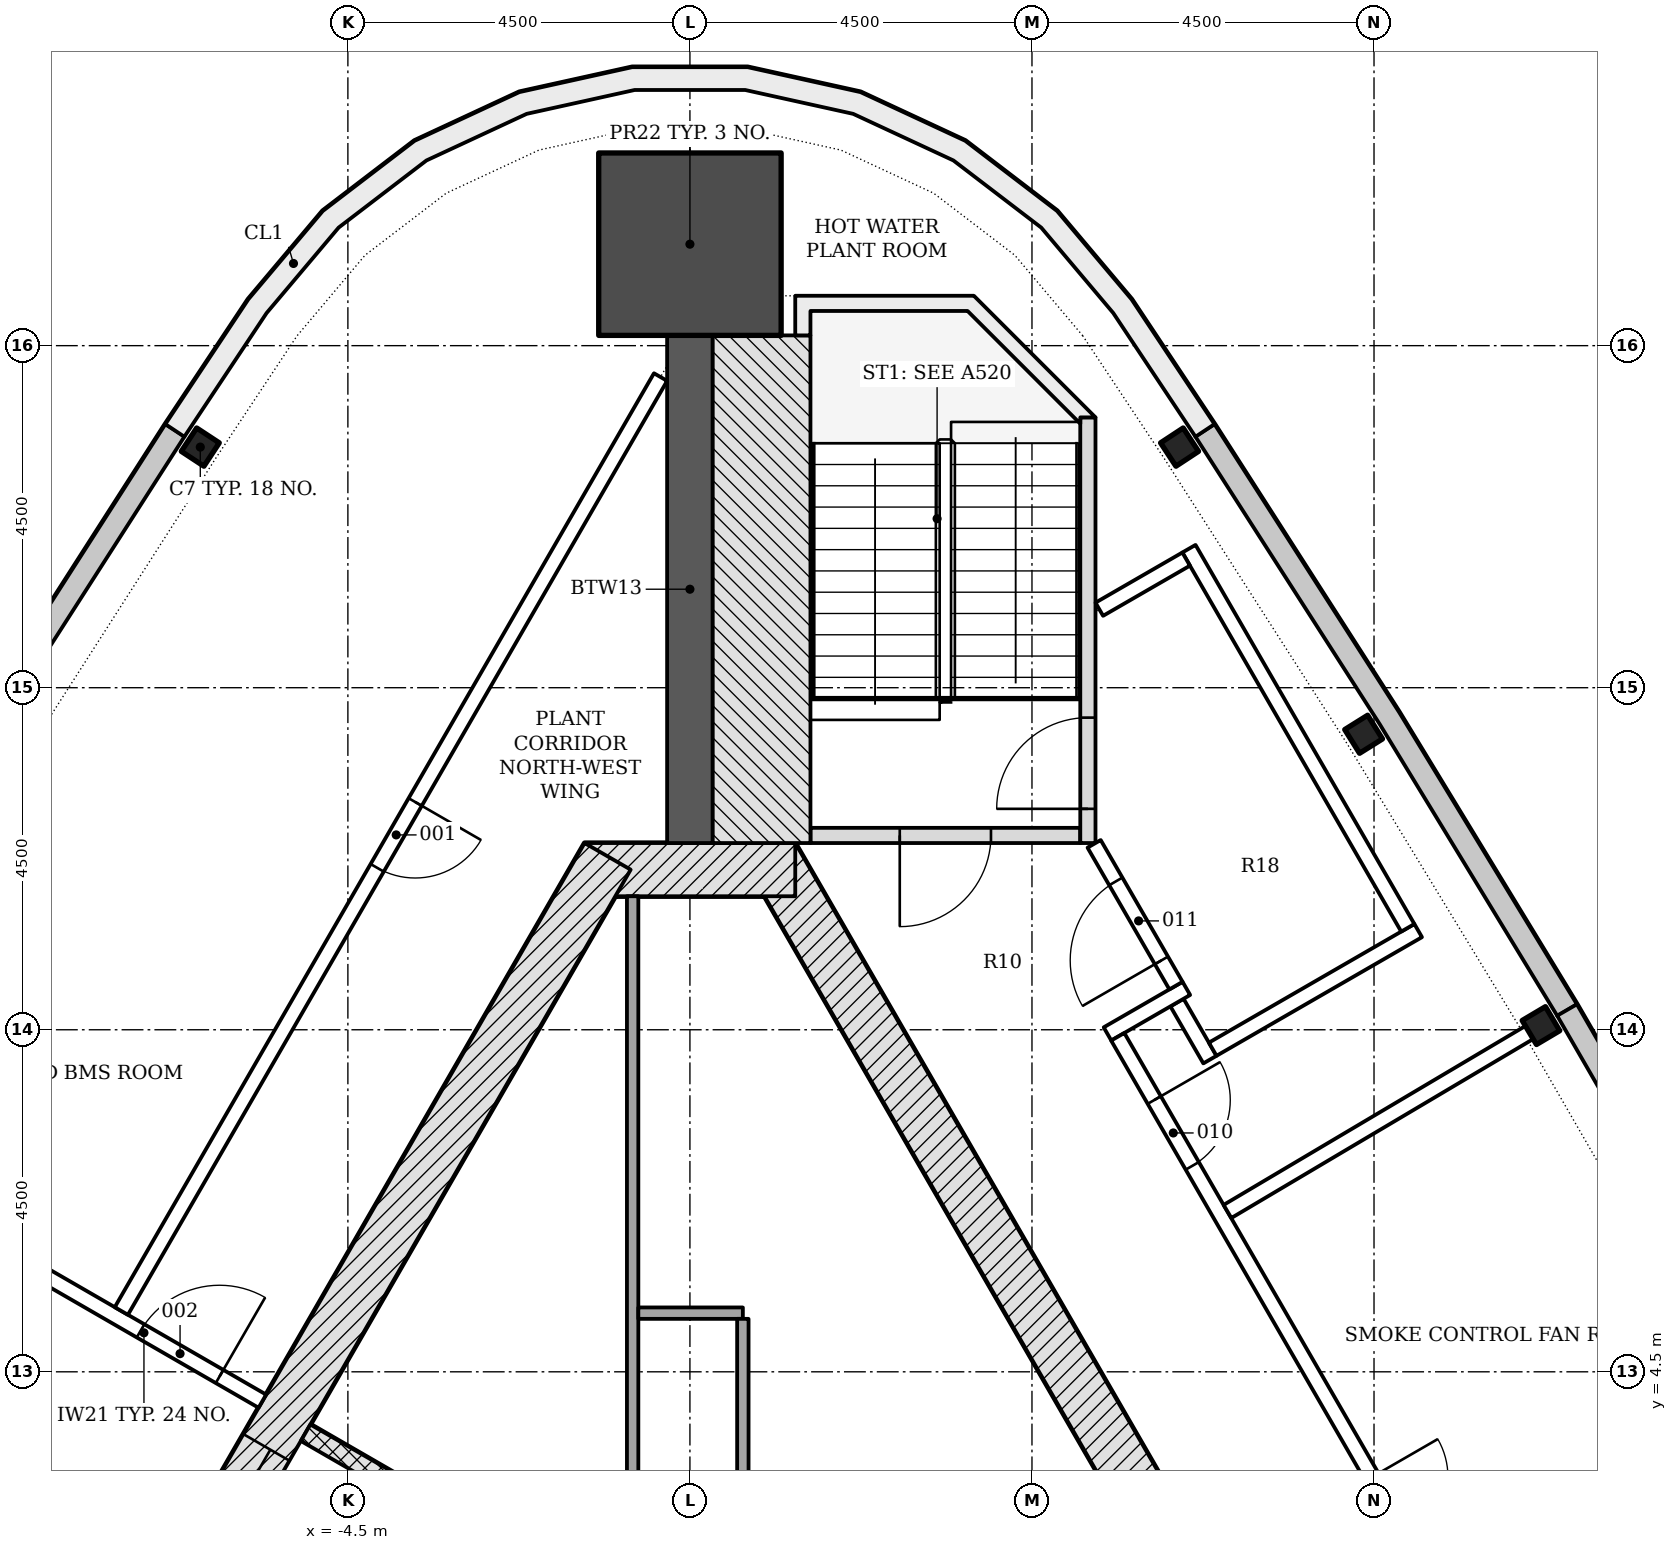
"""IFC4 building model, lengths in metres.
Left out: names, types, materials, properties, quantities, classifications, styles, units other than length and angle.
Written with IfcOpenShell. Run it as: python <this file> out.ifc"""

import sys

from ifc_helpers import new_model, si_unit, direction, frame, frame_2d, origin, origin_2d, place, context, subcontext, project, spatial, polyline, rectangle, i_section, outline, extrude, element, fill, save


model = new_model("IFC4")
c1 = context("Model", 3, precision=1e-05, world=origin(), true_north=direction((0.0, 1.0)))
c2 = subcontext(c1, "Body", "Model", "MODEL_VIEW")
j1 = project(units=[si_unit("LENGTHUNIT", "METRE"), si_unit("PLANEANGLEUNIT", "RADIAN")], contexts=[c1])
p1 = place(None, origin())
s1 = spatial("IfcSite", under=j1, at=p1, CompositionType="ELEMENT")
p2 = place(p1, origin())
s2 = spatial("IfcBuilding", under=s1, at=p2, CompositionType="ELEMENT")
p3 = place(p2, frame((0.0, 0.0, 293.1)))
s3 = spatial("IfcBuildingStorey", under=s2, at=p3, CompositionType="ELEMENT", Elevation=293.1)
p4 = place(p3, frame((10.311, -4.703, -0.25), z_axis=(0.0, 0.0, 1.0), x_axis=(-0.500001446645, 0.866024568562, 0.0)))
e1 = element("IfcWall", 1, at=p4, inside=s3, PredefinedType="SHEAR", context=c2, shape_type="SweptSolid", body=[
    extrude(rectangle(XDim=18.458, YDim=0.7, at=frame_2d((9.229, 0.0))), origin(), (0.0, 0.0, 1.0), 4.5),
])
p5 = place(p3, frame((1.386, 11.106, -0.25), z_axis=(0.0, 0.0, 1.0), x_axis=(-1.0, 0.0, 0.0)))
e2 = element("IfcWall", 2, at=p5, inside=s3, PredefinedType="SHEAR", context=c2, shape_type="SweptSolid", body=[
    extrude(rectangle(XDim=2.771, YDim=0.7, at=frame_2d((1.386, 0.0))), origin(), (0.0, 0.0, 1.0), 4.5),
])
p6 = place(p3, frame((-1.083, 11.281, -0.25), z_axis=(0.0, 0.0, 1.0), x_axis=(-0.500001446645, -0.866024568562, 0.0)))
e3 = element("IfcWall", 3, at=p6, inside=s3, PredefinedType="SHEAR", context=c2, shape_type="SweptSolid", body=[
    extrude(rectangle(XDim=18.458, YDim=0.7, at=frame_2d((9.229, 0.0))), origin(), (0.0, 0.0, 1.0), 4.5),
])
p7 = place(p6, frame((8.979, 0.0, 0.25)))
e4 = element("IfcOpeningElement", 4, at=p7, cuts=e3, PredefinedType="OPENING", context=c2, shape_type="SweptSolid", body=[
    extrude(rectangle(XDim=1.2, YDim=2.1, at=frame_2d((0.6, 1.05))), frame((0.0, 0.36, 0.0), z_axis=(0.0, -1.0, 0.0), x_axis=(1.0, 0.0, 0.0)), (0.0, 0.0, 1.0), 0.72),
])
p8 = place(p6, frame((11.029, 0.0, 0.25)))
e5 = element("IfcOpeningElement", 5, at=p8, cuts=e3, PredefinedType="OPENING", context=c2, shape_type="SweptSolid", body=[
    extrude(rectangle(XDim=1.2, YDim=2.1, at=frame_2d((0.6, 1.05))), frame((0.0, 0.36, 0.0), z_axis=(0.0, -1.0, 0.0), x_axis=(1.0, 0.0, 0.0)), (0.0, 0.0, 1.0), 0.72),
])
p9 = place(p3, frame((0.0, 11.456, -0.25), z_axis=(0.0, 0.0, 1.0), x_axis=(0.0, 1.0, 0.0)))
e6 = element("IfcWall", 6, at=p9, inside=s3, PredefinedType="SHEAR", context=c2, shape_type="SweptSolid", body=[
    extrude(rectangle(XDim=6.679, YDim=0.6, at=frame_2d((3.339, 0.0))), origin(), (0.0, 0.0, 1.0), 4.5),
])
p10 = place(p3, frame((0.0, 19.335, -0.25), z_axis=(0.0, 0.0, 1.0), x_axis=(0.0, 1.0, 0.0)))
e7 = element("IfcColumn", 7, at=p10, inside=s3, PredefinedType="COLUMN", context=c2, shape_type="SweptSolid", body=[
    extrude(rectangle(XDim=2.4, YDim=2.4, at=origin_2d()), origin(), (0.0, 0.0, 1.0), 4.5),
])
for number, where, z_axis, x_axis in (
    (8, (-6.442, 16.666, -0.25), (0.0, 0.0, 1.0), (-0.549, -0.836, 0.0)),
    (9, (11.196, 9.055, -0.25), (0.0, 0.0, 1.0), (-0.51, 0.86, 0.0)),
    (10, (8.863, 12.888, -0.25), (0.0, 0.0, 1.0), (-0.53, 0.848, 0.0)),
    (11, (6.442, 16.666, -0.25), (0.0, 0.0, 1.0), (-0.549, 0.836, 0.0)),
):
    element("IfcColumn", number, at=place(p3, frame(where, z_axis=z_axis, x_axis=x_axis)), inside=s3, PredefinedType="COLUMN", context=c2, shape_type="SweptSolid", body=[
        extrude(i_section(OverallWidth=0.368, OverallDepth=0.356, WebThickness=0.011, FlangeThickness=0.018, FilletRadius=0.015, at=origin_2d()), origin(), (0.0, 0.0, 1.0), 4.5),
    ])
p11 = place(p3, origin())
e12 = element("IfcWall", 12, at=p11, inside=s3, PredefinedType="NOTDEFINED", context=c2, shape_type="SweptSolid", body=[
    extrude(outline(polyline([(-6.901, 16.968), (-9.33, 13.179), (-11.669, 9.335), (-11.413, 9.179), (-9.075, 13.02), (-6.649, 16.806), (-6.901, 16.968)])), origin(), (0.0, 0.0, 1.0), 4.25),
])
p12 = place(p3, origin())
e13 = element("IfcWall", 13, at=p12, inside=s3, PredefinedType="NOTDEFINED", context=c2, shape_type="SweptSolid", body=[
    extrude(outline(polyline([(11.669, 9.335), (9.33, 13.179), (6.901, 16.968), (6.649, 16.806), (9.075, 13.02), (11.413, 9.179), (11.669, 9.335)])), origin(), (0.0, 0.0, 1.0), 4.25),
])
p13 = place(p3, origin())
e14 = element("IfcWall", 14, at=p13, inside=s3, PredefinedType="NOTDEFINED", context=c2, shape_type="SweptSolid", body=[
    extrude(outline(polyline([(13.919, 5.438), (11.669, 9.335), (11.409, 9.185), (13.659, 5.288), (13.919, 5.438)])), origin(), (0.0, 0.0, 1.0), 1.2),
])
p14 = place(p3, origin())
e15 = element("IfcWall", 15, at=p14, inside=s3, PredefinedType="NOTDEFINED", context=c2, shape_type="SweptSolid", body=[
    extrude(outline(polyline([(6.901, 16.968), (5.81, 18.61), (4.83, 19.771), (3.623, 20.695), (2.244, 21.335), (0.76, 21.664), (-0.76, 21.664), (-2.244, 21.335), (-3.623, 20.695), (-4.83, 19.771), (-5.81, 18.61), (-6.901, 16.968), (-6.651, 16.802), (-5.569, 18.429), (-4.622, 19.553), (-3.466, 20.437), (-2.147, 21.05), (-0.727, 21.364), (0.727, 21.364), (2.147, 21.05), (3.466, 20.437), (4.622, 19.553), (5.569, 18.429), (6.651, 16.802), (6.901, 16.968)])), origin(), (0.0, 0.0, 1.0), 4.25),
])
p15 = place(p3, frame((-5.056, 3.699, -0.25), z_axis=(0.0, 0.0, 1.0), x_axis=(0.866032775405, -0.499987231761, 0.0)))
e16 = element("IfcWall", 16, at=p15, inside=s3, PredefinedType="PARTITIONING", context=c2, shape_type="SweptSolid", body=[
    extrude(rectangle(XDim=2.9, YDim=0.25, at=frame_2d((1.45, 0.0))), origin(), (0.0, 0.0, 1.0), 4.5),
])
p16 = place(p3, frame((-0.754, 10.756, 0.0), z_axis=(0.0, 0.0, 1.0), x_axis=(0.0, -1.0, 0.0)))
e17 = element("IfcWall", 17, at=p16, inside=s3, PredefinedType="PARTITIONING", context=c2, shape_type="SweptSolid", body=[
    extrude(rectangle(XDim=16.985, YDim=0.15, at=frame_2d((8.492, 0.0))), origin(), (0.0, 0.0, 1.0), 4.25),
])
p17 = place(p16, frame((9.185, 0.0, 0.0)))
e18 = element("IfcOpeningElement", 18, at=p17, cuts=e17, PredefinedType="OPENING", context=c2, shape_type="SweptSolid", body=[
    extrude(rectangle(XDim=0.9, YDim=2.1, at=frame_2d((0.45, 1.05))), frame((0.0, 0.085, 0.0), z_axis=(0.0, -1.0, 0.0), x_axis=(1.0, 0.0, 0.0)), (0.0, 0.0, 1.0), 0.17),
])
p18 = place(p3, frame((-0.679, 5.272, 0.0), z_axis=(0.0, 0.0, 1.0), x_axis=(1.0, 0.0, 0.0)))
e19 = element("IfcWall", 19, at=p18, inside=s3, PredefinedType="PARTITIONING", context=c2, shape_type="SweptSolid", body=[
    extrude(rectangle(XDim=1.375, YDim=0.15, at=frame_2d((0.688, 0.0))), origin(), (0.0, 0.0, 1.0), 4.25),
])
p19 = place(p3, frame((0.696, 5.197, 0.0), z_axis=(0.0, 0.0, 1.0), x_axis=(0.0, -1.0, 0.0)))
e20 = element("IfcWall", 20, at=p19, inside=s3, PredefinedType="PARTITIONING", context=c2, shape_type="SweptSolid", body=[
    extrude(rectangle(XDim=11.425, YDim=0.15, at=frame_2d((5.712, 0.0))), origin(), (0.0, 0.0, 1.0), 4.25),
])
p20 = place(p19, frame((3.664, 0.0, 0.0)))
e21 = element("IfcOpeningElement", 21, at=p20, cuts=e20, PredefinedType="OPENING", context=c2, shape_type="SweptSolid", body=[
    extrude(rectangle(XDim=0.9, YDim=2.1, at=frame_2d((0.45, 1.05))), frame((0.0, 0.085, 0.0), z_axis=(0.0, -1.0, 0.0), x_axis=(1.0, 0.0, 0.0)), (0.0, 0.0, 1.0), 0.17),
])
p21 = place(p3, frame((5.135, 11.556, -0.25), z_axis=(0.0, 0.0, 1.0), x_axis=(-1.0, 0.0, 0.0)))
e22 = element("IfcWall", 22, at=p21, inside=s3, PredefinedType="SHEAR", context=c2, shape_type="SweptSolid", body=[
    extrude(rectangle(XDim=3.55, YDim=0.2, at=frame_2d((1.775, 0.0))), origin(), (0.0, 0.0, 1.0), 4.5),
])
p22 = place(p21, frame((1.175, 0.0, 0.25)))
e23 = element("IfcOpeningElement", 23, at=p22, cuts=e22, PredefinedType="OPENING", context=c2, shape_type="SweptSolid", body=[
    extrude(rectangle(XDim=1.2, YDim=2.1, at=frame_2d((0.6, 1.05))), frame((0.0, 0.11, 0.0), z_axis=(0.0, -1.0, 0.0), x_axis=(1.0, 0.0, 0.0)), (0.0, 0.0, 1.0), 0.22),
])
p23 = place(p3, frame((5.236, 11.456, -0.25), z_axis=(0.0, 0.0, 1.0), x_axis=(0.0, 1.0, 0.0)))
e24 = element("IfcWall", 24, at=p23, inside=s3, PredefinedType="SHEAR", context=c2, shape_type="SweptSolid", body=[
    extrude(rectangle(XDim=5.6, YDim=0.2, at=frame_2d((2.8, 0.0))), origin(), (0.0, 0.0, 1.0), 4.5),
])
p24 = place(p23, frame((0.45, 0.0, 0.25)))
e25 = element("IfcOpeningElement", 25, at=p24, cuts=e24, PredefinedType="OPENING", context=c2, shape_type="SweptSolid", body=[
    extrude(rectangle(XDim=1.2, YDim=2.1, at=frame_2d((0.6, 1.05))), frame((0.0, 0.11, 0.0), z_axis=(0.0, -1.0, 0.0), x_axis=(1.0, 0.0, 0.0)), (0.0, 0.0, 1.0), 0.22),
])
p25 = place(p3, frame((0.943, 11.456, -0.25), z_axis=(0.0, 0.0, 1.0), x_axis=(0.0, 1.0, 0.0)))
e26 = element("IfcWall", 26, at=p25, inside=s3, PredefinedType="SHEAR", context=c2, shape_type="SweptSolid", body=[
    extrude(rectangle(XDim=6.679, YDim=1.286, at=frame_2d((3.339, 0.0))), origin(), (0.0, 0.0, 1.0), 4.5),
])
p26 = place(p3, frame((0.0, 0.0, -0.25)))
e27 = element("IfcWall", 27, at=p26, inside=s3, PredefinedType="SHEAR", context=c2, shape_type="SweptSolid", body=[
    extrude(outline(polyline([(5.336, 17.056), (3.736, 18.656), (1.385, 18.656), (1.385, 18.135), (1.586, 18.135), (1.586, 18.456), (3.653, 18.456), (5.135, 16.974), (5.135, 17.056), (5.135, 17.056), (5.135, 17.056), (5.135, 17.056), (5.135, 17.056), (5.135, 17.056), (5.135, 17.056), (5.135, 17.056), (5.135, 17.056), (5.135, 17.056), (5.135, 17.056), (5.135, 17.056), (5.135, 17.056), (5.135, 17.056), (5.135, 17.056), (5.135, 17.056), (5.135, 17.056), (5.336, 17.056)])), origin(), (0.0, 0.0, 1.0), 4.5),
])
p27 = place(p3, frame((-8.741, 5.913, 0.0), z_axis=(0.0, 0.0, 1.0), x_axis=(0.866017220491, -0.500014173611, 0.0)))
e28 = element("IfcWall", 28, at=p27, inside=s3, PredefinedType="PARTITIONING", context=c2, shape_type="SweptSolid", body=[
    extrude(rectangle(XDim=3.598, YDim=0.2, at=frame_2d((1.799, 0.0))), origin(), (0.0, 0.0, 1.0), 4.25),
])
p28 = place(p27, frame((1.748, 0.0, 0.0)))
e29 = element("IfcOpeningElement", 29, at=p28, cuts=e28, PredefinedType="OPENING", context=c2, shape_type="SweptSolid", body=[
    extrude(rectangle(XDim=1.2, YDim=2.1, at=frame_2d((0.6, 1.05))), frame((0.0, 0.11, 0.0), z_axis=(0.0, -1.0, 0.0), x_axis=(1.0, 0.0, 0.0)), (0.0, 0.0, 1.0), 0.22),
])
p29 = place(p3, frame((-0.387, 17.587, 0.0), z_axis=(0.0, 0.0, 1.0), x_axis=(-0.499990582914, -0.866030840673, 0.0)))
e30 = element("IfcWall", 30, at=p29, inside=s3, PredefinedType="PARTITIONING", context=c2, shape_type="SweptSolid", body=[
    extrude(rectangle(XDim=14.187, YDim=0.2, at=frame_2d((7.094, 0.0))), origin(), (0.0, 0.0, 1.0), 3.702),
])
p30 = place(p29, frame((6.455, 0.0, 0.0)))
e31 = element("IfcOpeningElement", 31, at=p30, cuts=e30, PredefinedType="OPENING", context=c2, shape_type="SweptSolid", body=[
    extrude(rectangle(XDim=1.0, YDim=2.1, at=frame_2d((0.5, 1.05))), frame((0.0, 0.11, 0.0), z_axis=(0.0, -1.0, 0.0), x_axis=(1.0, 0.0, 0.0)), (0.0, 0.0, 1.0), 0.22),
])
p31 = place(p3, frame((6.408, 9.358, 0.0), z_axis=(0.0, 0.0, 1.0), x_axis=(0.499958279983, -0.866049489508, 0.0)))
e32 = element("IfcWall", 32, at=p31, inside=s3, PredefinedType="PARTITIONING", context=c2, shape_type="SweptSolid", body=[
    extrude(rectangle(XDim=0.866, YDim=0.2, at=frame_2d((0.433, 0.0))), origin(), (0.0, 0.0, 1.0), 4.25),
])
p32 = place(p3, frame((5.494, 8.945, 0.0), z_axis=(0.0, 0.0, 1.0), x_axis=(0.866039638822, 0.499975343382, 0.0)))
e33 = element("IfcWall", 33, at=p32, inside=s3, PredefinedType="PARTITIONING", context=c2, shape_type="SweptSolid", body=[
    extrude(rectangle(XDim=1.198, YDim=0.2, at=frame_2d((0.599, 0.0))), origin(), (0.0, 0.0, 1.0), 4.25),
])
p33 = place(p3, frame((6.395, 9.581, 0.0), z_axis=(0.0, 0.0, 1.0), x_axis=(-0.500003735859, 0.866023246874, 0.0)))
e34 = element("IfcWall", 34, at=p33, inside=s3, PredefinedType="PARTITIONING", context=c2, shape_type="SweptSolid", body=[
    extrude(rectangle(XDim=2.154, YDim=0.2, at=frame_2d((1.077, 0.0))), origin(), (0.0, 0.0, 1.0), 3.702),
])
p34 = place(p33, frame((0.383, 0.0, 0.0)))
e35 = element("IfcOpeningElement", 35, at=p34, cuts=e34, PredefinedType="OPENING", context=c2, shape_type="SweptSolid", body=[
    extrude(rectangle(XDim=1.2, YDim=2.1, at=frame_2d((0.6, 1.05))), frame((0.0, 0.11, 0.0), z_axis=(0.0, -1.0, 0.0), x_axis=(1.0, 0.0, 0.0)), (0.0, 0.0, 1.0), 0.22),
])
p35 = place(p3, frame((5.628, 8.908, 0.0), z_axis=(0.0, 0.0, 1.0), x_axis=(0.500003229304, -0.866023539337, 0.0)))
e36 = element("IfcWall", 36, at=p35, inside=s3, PredefinedType="PARTITIONING", context=c2, shape_type="SweptSolid", body=[
    extrude(rectangle(XDim=20.297, YDim=0.2, at=frame_2d((10.148, 0.0))), origin(), (0.0, 0.0, 1.0), 3.702),
])
p36 = place(p35, frame((15.459, 0.0, 0.0)))
e37 = element("IfcOpeningElement", 37, at=p36, cuts=e36, PredefinedType="OPENING", context=c2, shape_type="SweptSolid", body=[
    extrude(rectangle(XDim=1.0, YDim=2.1, at=frame_2d((0.5, 1.05))), frame((0.0, 0.11, 0.0), z_axis=(0.0, -1.0, 0.0), x_axis=(1.0, 0.0, 0.0)), (0.0, 0.0, 1.0), 0.22),
])
p37 = place(p35, frame((6.689, 0.0, 0.0)))
e38 = element("IfcOpeningElement", 38, at=p37, cuts=e36, PredefinedType="OPENING", context=c2, shape_type="SweptSolid", body=[
    extrude(rectangle(XDim=1.0, YDim=2.1, at=frame_2d((0.5, 1.05))), frame((0.0, 0.11, 0.0), z_axis=(0.0, -1.0, 0.0), x_axis=(1.0, 0.0, 0.0)), (0.0, 0.0, 1.0), 0.22),
])
p38 = place(p35, frame((0.961, 0.0, 0.0)))
e39 = element("IfcOpeningElement", 39, at=p38, cuts=e36, PredefinedType="OPENING", context=c2, shape_type="SweptSolid", body=[
    extrude(rectangle(XDim=1.0, YDim=2.1, at=frame_2d((0.5, 1.05))), frame((0.0, 0.11, 0.0), z_axis=(0.0, -1.0, 0.0), x_axis=(1.0, 0.0, 0.0)), (0.0, 0.0, 1.0), 0.22),
])
p39 = place(p3, frame((7.072, 6.61, 0.0), z_axis=(0.0, 0.0, 1.0), x_axis=(0.860180512155, 0.509989692552, 0.0)))
e40 = element("IfcWall", 40, at=p39, inside=s3, PredefinedType="PARTITIONING", context=c2, shape_type="SweptSolid", body=[
    extrude(rectangle(XDim=4.645, YDim=0.2, at=frame_2d((2.322, 0.0))), origin(), (0.0, 0.0, 1.0), 3.702),
])
p40 = place(p3, frame((6.878, 8.744, 0.0), z_axis=(0.0, 0.0, 1.0), x_axis=(0.866025387892, 0.500000027526, 0.0)))
e41 = element("IfcWall", 41, at=p40, inside=s3, PredefinedType="PARTITIONING", context=c2, shape_type="SweptSolid", body=[
    extrude(rectangle(XDim=3.122, YDim=0.2, at=frame_2d((1.561, 0.0))), origin(), (0.0, 0.0, 1.0), 4.25),
])
p41 = place(p3, frame((9.445, 10.341, 0.0), z_axis=(0.0, 0.0, 1.0), x_axis=(-0.499996461177, 0.866027446915, 0.0)))
e42 = element("IfcWall", 42, at=p41, inside=s3, PredefinedType="PARTITIONING", context=c2, shape_type="SweptSolid", body=[
    extrude(rectangle(XDim=5.759, YDim=0.2, at=frame_2d((2.879, 0.0))), origin(), (0.0, 0.0, 1.0), 3.702),
])
p42 = place(p3, frame((6.529, 15.192, 0.0), z_axis=(0.0, 0.0, 1.0), x_axis=(-0.866117824122, -0.499839889103, 0.0)))
e43 = element("IfcWall", 43, at=p42, inside=s3, PredefinedType="PARTITIONING", context=c2, shape_type="SweptSolid", body=[
    extrude(rectangle(XDim=1.32, YDim=0.2, at=frame_2d((0.66, 0.0))), origin(), (0.0, 0.0, 1.0), 4.25),
])
p43 = place(p7, origin())
e44 = element("IfcDoor", 44, at=p43, inside=s3, OperationType="DOUBLE_DOOR_SLIDING", PredefinedType="DOOR", context=c2, shape_type="SweptSolid", body=[
    extrude(rectangle(XDim=1.2, YDim=2.1, at=frame_2d((0.6, 1.05))), frame((0.0, 0.025, 0.0), z_axis=(0.0, -1.0, 0.0), x_axis=(1.0, 0.0, 0.0)), (0.0, 0.0, 1.0), 0.05),
])
fill(e4, e44)
p44 = place(p22, origin())
e45 = element("IfcDoor", 45, at=p44, inside=s3, OperationType="SINGLE_SWING_RIGHT", PredefinedType="DOOR", context=c2, shape_type="SweptSolid", body=[
    extrude(rectangle(XDim=1.2, YDim=2.1, at=frame_2d((0.6, 1.05))), frame((0.0, 0.025, 0.0), z_axis=(0.0, -1.0, 0.0), x_axis=(1.0, 0.0, 0.0)), (0.0, 0.0, 1.0), 0.05),
])
fill(e23, e45)
p45 = place(p24, origin())
e46 = element("IfcDoor", 46, at=p45, inside=s3, OperationType="SINGLE_SWING_LEFT", PredefinedType="DOOR", context=c2, shape_type="SweptSolid", body=[
    extrude(rectangle(XDim=1.2, YDim=2.1, at=frame_2d((0.6, 1.05))), frame((0.0, 0.025, 0.0), z_axis=(0.0, -1.0, 0.0), x_axis=(1.0, 0.0, 0.0)), (0.0, 0.0, 1.0), 0.05),
])
fill(e25, e46)
p46 = place(p30, origin())
e47 = element("IfcDoor", 47, at=p46, inside=s3, OperationType="SINGLE_SWING_LEFT", PredefinedType="DOOR", context=c2, shape_type="SweptSolid", body=[
    extrude(rectangle(XDim=1.0, YDim=2.1, at=frame_2d((0.5, 1.05))), frame((0.0, 0.025, 0.0), z_axis=(0.0, -1.0, 0.0), x_axis=(1.0, 0.0, 0.0)), (0.0, 0.0, 1.0), 0.05),
])
fill(e31, e47)
p47 = place(p28, origin())
e48 = element("IfcDoor", 48, at=p47, inside=s3, OperationType="SINGLE_SWING_RIGHT", PredefinedType="DOOR", context=c2, shape_type="SweptSolid", body=[
    extrude(rectangle(XDim=1.2, YDim=2.1, at=frame_2d((0.6, 1.05))), frame((0.0, 0.025, 0.0), z_axis=(0.0, -1.0, 0.0), x_axis=(1.0, 0.0, 0.0)), (0.0, 0.0, 1.0), 0.05),
])
fill(e29, e48)
p48 = place(p38, origin())
e49 = element("IfcDoor", 49, at=p48, inside=s3, OperationType="SINGLE_SWING_LEFT", PredefinedType="DOOR", context=c2, shape_type="SweptSolid", body=[
    extrude(rectangle(XDim=1.0, YDim=2.1, at=frame_2d((0.5, 1.05))), frame((0.0, 0.025, 0.0), z_axis=(0.0, -1.0, 0.0), x_axis=(1.0, 0.0, 0.0)), (0.0, 0.0, 1.0), 0.05),
])
fill(e39, e49)
p49 = place(p34, origin())
e50 = element("IfcDoor", 50, at=p49, inside=s3, OperationType="SINGLE_SWING_LEFT", PredefinedType="DOOR", context=c2, shape_type="SweptSolid", body=[
    extrude(rectangle(XDim=1.2, YDim=2.1, at=frame_2d((0.6, 1.05))), frame((0.0, 0.025, 0.0), z_axis=(0.0, -1.0, 0.0), x_axis=(1.0, 0.0, 0.0)), (0.0, 0.0, 1.0), 0.05),
])
fill(e35, e50)
save(model, sys.argv[1])
